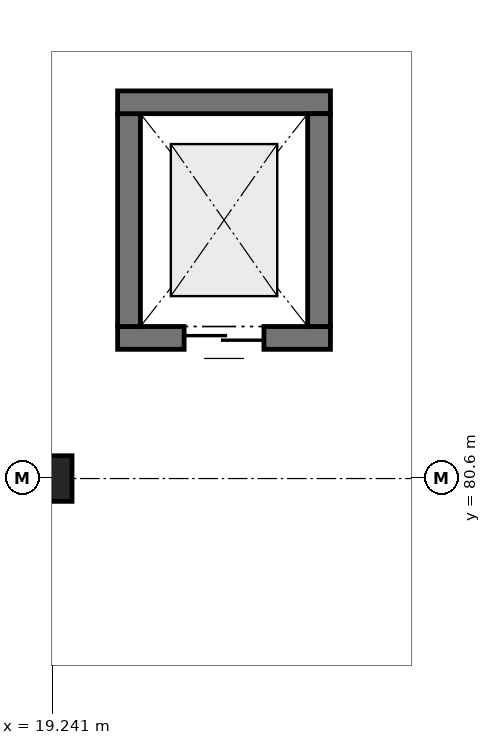
"""IFC4 building model, lengths in metres.
Left out: names, types, materials, properties, quantities, classifications, styles, units other than length and angle.
Written with IfcOpenShell. Run it as: python <this file> out.ifc"""

import sys

from ifc_helpers import new_model, si_unit, direction, frame, frame_2d, origin, origin_2d, place, context, subcontext, project, spatial, rectangle, extrude, element, fill, save


model = new_model("IFC4")
c1 = context("Model", 3, precision=1e-05, world=origin(), true_north=direction((0.0, 1.0)))
c2 = subcontext(c1, "Body", "Model", "MODEL_VIEW")
j1 = project(units=[si_unit("LENGTHUNIT", "METRE"), si_unit("PLANEANGLEUNIT", "RADIAN")], contexts=[c1])
p1 = place(None, origin())
s1 = spatial("IfcSite", under=j1, at=p1, CompositionType="ELEMENT")
p2 = place(p1, origin())
s2 = spatial("IfcBuilding", under=s1, at=p2, CompositionType="ELEMENT")
p3 = place(p2, frame((0.0, 0.0, 4.8)))
s3 = spatial("IfcBuildingStorey", under=s2, at=p3, CompositionType="ELEMENT", Elevation=4.8)
p4 = place(p3, frame((19.2, 80.6, 0.0), z_axis=(0.0, 0.0, 1.0), x_axis=(1.0, 0.0, 0.0)))
e1 = element("IfcColumn", 1, at=p4, inside=s3, PredefinedType="COLUMN", context=c2, shape_type="SweptSolid", body=[
    extrude(rectangle(XDim=0.6, YDim=0.6, at=origin_2d()), origin(), (0.0, 0.0, 1.0), 4.2),
])
p5 = place(p3, frame((22.9, 82.45, 0.0), z_axis=(0.0, 0.0, 1.0), x_axis=(-1.0, 0.0, 0.0)))
e2 = element("IfcWall", 2, at=p5, inside=s3, PredefinedType="SOLIDWALL", context=c2, shape_type="SweptSolid", body=[
    extrude(rectangle(XDim=2.8, YDim=0.3, at=frame_2d((1.4, 0.0))), origin(), (0.0, 0.0, 1.0), 4.2),
])
p6 = place(p5, frame((0.875, 0.0, 0.0)))
e3 = element("IfcOpeningElement", 3, at=p6, cuts=e2, PredefinedType="OPENING", context=c2, shape_type="SweptSolid", body=[
    extrude(rectangle(XDim=1.05, YDim=2.15, at=frame_2d((0.525, 1.075))), frame((0.0, 0.17, 0.0), z_axis=(0.0, -1.0, 0.0), x_axis=(1.0, 0.0, 0.0)), (0.0, 0.0, 1.0), 0.34),
])
for number, where, z_axis, x_axis in (
    (4, (20.25, 82.6, 0.0), (0.0, 0.0, 1.0), (0.0, 1.0, 0.0)),
    (5, (20.1, 85.55, 0.0), (0.0, 0.0, 1.0), (1.0, 0.0, 0.0)),
    (6, (22.75, 85.4, 0.0), (0.0, 0.0, 1.0), (0.0, -1.0, 0.0)),
):
    element("IfcWall", number, at=place(p3, frame(where, z_axis=z_axis, x_axis=x_axis)), inside=s3, PredefinedType="SOLIDWALL", context=c2, shape_type="SweptSolid", body=[
        extrude(rectangle(XDim=2.8, YDim=0.3, at=frame_2d((1.4, 0.0))), origin(), (0.0, 0.0, 1.0), 4.2),
    ])
p7 = place(p6, origin())
e7 = element("IfcDoor", 7, at=p7, inside=s3, OperationType="DOUBLE_DOOR_SLIDING", PredefinedType="DOOR", context=c2, shape_type="SweptSolid", body=[
    extrude(rectangle(XDim=1.05, YDim=2.15, at=frame_2d((0.525, 1.075))), frame((0.0, 0.025, 0.0), z_axis=(0.0, -1.0, 0.0), x_axis=(1.0, 0.0, 0.0)), (0.0, 0.0, 1.0), 0.05),
])
fill(e3, e7)
save(model, sys.argv[1])
